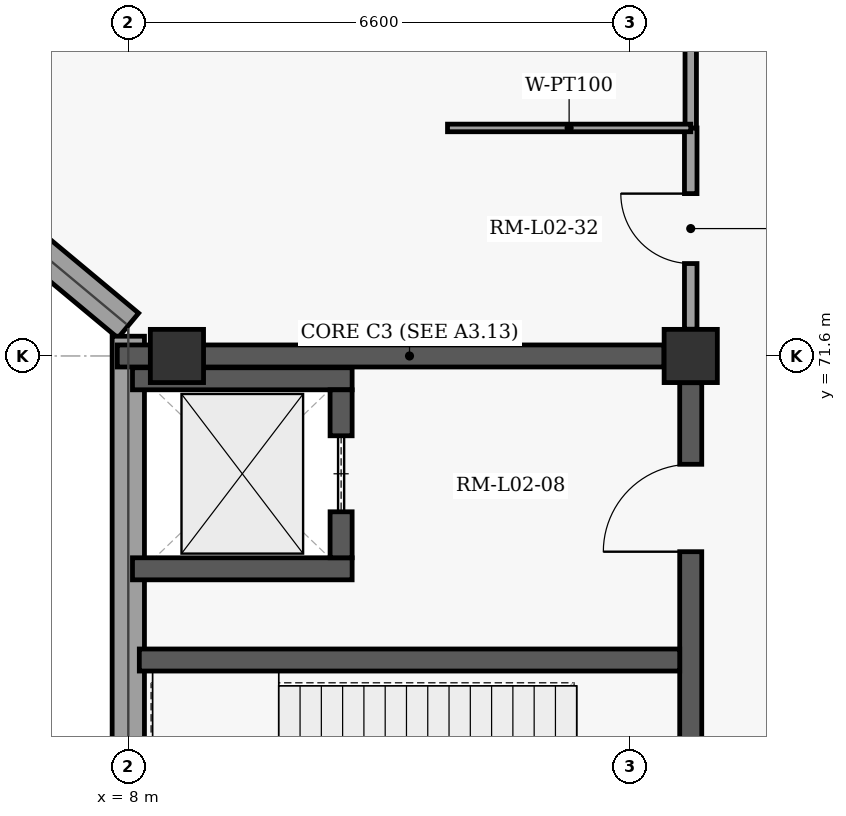
"""IFC4 building model, lengths in metres.
Left out: names, types, materials, properties, quantities, classifications, styles, units other than length and angle.
Written with IfcOpenShell. Run it as: python <this file> out.ifc"""

import sys

from ifc_helpers import new_model, si_unit, direction, frame, frame_2d, origin, origin_2d, place, context, subcontext, project, spatial, rectangle, extrude, element, fill, save


model = new_model("IFC4")
c1 = context("Model", 3, precision=1e-05, world=origin(), true_north=direction((0.0, 1.0)))
c2 = subcontext(c1, "Body", "Model", "MODEL_VIEW")
j1 = project(units=[si_unit("LENGTHUNIT", "METRE"), si_unit("PLANEANGLEUNIT", "RADIAN")], contexts=[c1])
p1 = place(None, origin())
s1 = spatial("IfcSite", under=j1, at=p1, CompositionType="ELEMENT")
p2 = place(p1, origin())
s2 = spatial("IfcBuilding", under=s1, at=p2, CompositionType="ELEMENT")
p3 = place(p2, frame((0.0, 0.0, 10.2)))
s3 = spatial("IfcBuildingStorey", under=s2, at=p3, CompositionType="ELEMENT", Elevation=10.2)
for number, where, z_axis, x_axis in (
    (1, (8.64, 71.6, 0.0), (0.0, 0.0, 1.0), (1.0, 0.0, 0.0)),
    (2, (15.4, 71.6, 0.0), (0.0, 0.0, 1.0), (1.0, 0.0, 0.0)),
):
    element("IfcColumn", number, at=place(p3, frame(where, z_axis=z_axis, x_axis=x_axis)), inside=s3, PredefinedType="COLUMN", context=c2, shape_type="SweptSolid", body=[
        extrude(rectangle(XDim=0.7, YDim=0.7, at=origin_2d()), origin(), (0.0, 0.0, 1.0), 5.4),
    ])
p4 = place(p3, frame((8.0, 72.0, 0.0), z_axis=(0.0, 0.0, 1.0), x_axis=(-0.768208468069, 0.640199773186, 0.0)))
e3 = element("IfcWall", 3, at=p4, inside=s3, PredefinedType="SOLIDWALL", context=c2, shape_type="SweptSolid", body=[
    extrude(rectangle(XDim=3.124, YDim=0.425, at=frame_2d((1.562, 0.0))), origin(), (0.0, 0.0, 1.0), 5.1),
])
p5 = place(p3, frame((8.0, 63.818, 0.0), z_axis=(0.0, 0.0, 1.0), x_axis=(0.0, 1.0, 0.0)))
e4 = element("IfcWall", 4, at=p5, inside=s3, PredefinedType="SOLIDWALL", context=c2, shape_type="SweptSolid", body=[
    extrude(rectangle(XDim=8.042, YDim=0.425, at=frame_2d((4.021, 0.0))), origin(), (0.0, 0.0, 1.0), 5.1),
])
p6 = place(p3, frame((7.855, 71.6, 0.0), z_axis=(0.0, 0.0, 1.0), x_axis=(1.0, 0.0, 0.0)))
e5 = element("IfcWall", 5, at=p6, inside=s3, PredefinedType="SHEAR", context=c2, shape_type="SweptSolid", body=[
    extrude(rectangle(XDim=7.193, YDim=0.29, at=frame_2d((3.597, 0.0))), origin(), (0.0, 0.0, 1.0), 5.1),
])
p7 = place(p3, frame((15.4, 64.145, 0.0), z_axis=(0.0, 0.0, 1.0), x_axis=(0.0, 1.0, 0.0)))
e6 = element("IfcWall", 6, at=p7, inside=s3, PredefinedType="SHEAR", context=c2, shape_type="SweptSolid", body=[
    extrude(rectangle(XDim=7.103, YDim=0.29, at=frame_2d((3.552, 0.0))), origin(), (0.0, 0.0, 1.0), 5.1),
])
p8 = place(p7, frame((1.105, 0.0, 0.0)))
e7 = element("IfcOpeningElement", 7, at=p8, cuts=e6, PredefinedType="OPENING", context=c2, shape_type="SweptSolid", body=[
    extrude(rectangle(XDim=1.1, YDim=2.15, at=frame_2d((0.55, 1.075))), frame((0.0, 0.155, 0.0), z_axis=(0.0, -1.0, 0.0), x_axis=(1.0, 0.0, 0.0)), (0.0, 0.0, 1.0), 0.31),
])
p9 = place(p7, frame((4.88, 0.0, 0.0)))
e8 = element("IfcOpeningElement", 8, at=p9, cuts=e6, PredefinedType="OPENING", context=c2, shape_type="SweptSolid", body=[
    extrude(rectangle(XDim=1.15, YDim=2.2, at=frame_2d((0.575, 1.1))), frame((0.0, 0.155, 0.0), z_axis=(0.0, -1.0, 0.0), x_axis=(1.0, 0.0, 0.0)), (0.0, 0.0, 1.0), 0.31),
])
p10 = place(p3, frame((8.145, 67.6, 0.0), z_axis=(0.0, 0.0, 1.0), x_axis=(1.0, 0.0, 0.0)))
e9 = element("IfcWall", 9, at=p10, inside=s3, PredefinedType="SHEAR", context=c2, shape_type="SweptSolid", body=[
    extrude(rectangle(XDim=7.11, YDim=0.29, at=frame_2d((3.555, 0.0))), origin(), (0.0, 0.0, 1.0), 5.1),
])
for number, where, z_axis, x_axis in (
    (10, (8.055, 68.8, 0.0), (0.0, 0.0, 1.0), (1.0, 0.0, 0.0)),
    (11, (8.055, 71.3, 0.0), (0.0, 0.0, 1.0), (1.0, 0.0, 0.0)),
):
    element("IfcWall", number, at=place(p3, frame(where, z_axis=z_axis, x_axis=x_axis)), inside=s3, PredefinedType="SHEAR", context=c2, shape_type="SweptSolid", body=[
        extrude(rectangle(XDim=2.89, YDim=0.29, at=frame_2d((1.445, 0.0))), origin(), (0.0, 0.0, 1.0), 5.1),
    ])
p11 = place(p3, frame((10.8, 68.945, 0.0), z_axis=(0.0, 0.0, 1.0), x_axis=(0.0, 1.0, 0.0)))
e12 = element("IfcWall", 12, at=p11, inside=s3, PredefinedType="SHEAR", context=c2, shape_type="SweptSolid", body=[
    extrude(rectangle(XDim=2.21, YDim=0.29, at=frame_2d((1.105, 0.0))), origin(), (0.0, 0.0, 1.0), 5.1),
])
p12 = place(p11, frame((0.605, 0.0, 0.0)))
e13 = element("IfcOpeningElement", 13, at=p12, cuts=e12, PredefinedType="OPENING", context=c2, shape_type="SweptSolid", body=[
    extrude(rectangle(XDim=1.0, YDim=2.15, at=frame_2d((0.5, 1.075))), frame((0.0, 0.155, 0.0), z_axis=(0.0, -1.0, 0.0), x_axis=(1.0, 0.0, 0.0)), (0.0, 0.0, 1.0), 0.31),
])
p13 = place(p3, frame((15.4, 71.952, 0.0), z_axis=(0.0, 0.0, 1.0), x_axis=(0.0, 1.0, 0.0)))
e14 = element("IfcWall", 14, at=p13, inside=s3, PredefinedType="PARTITIONING", context=c2, shape_type="SweptSolid", body=[
    extrude(rectangle(XDim=2.648, YDim=0.165, at=frame_2d((1.324, 0.0))), origin(), (0.0, 0.0, 1.0), 4.25),
])
p14 = place(p13, frame((0.864, 0.0, 0.0)))
e15 = element("IfcOpeningElement", 15, at=p14, cuts=e14, PredefinedType="OPENING", context=c2, shape_type="SweptSolid", body=[
    extrude(rectangle(XDim=0.92, YDim=2.1, at=frame_2d((0.46, 1.05))), frame((0.0, 0.093, 0.0), z_axis=(0.0, -1.0, 0.0), x_axis=(1.0, 0.0, 0.0)), (0.0, 0.0, 1.0), 0.185),
])
p15 = place(p3, frame((15.4, 74.6, 0.0), z_axis=(0.0, 0.0, 1.0), x_axis=(0.0, 1.0, 0.0)))
e16 = element("IfcWall", 16, at=p15, inside=s3, PredefinedType="PARTITIONING", context=c2, shape_type="SweptSolid", body=[
    extrude(rectangle(XDim=19.4, YDim=0.15, at=frame_2d((9.7, 0.0))), origin(), (0.0, 0.0, 1.0), 4.25),
])
p16 = place(p15, frame((9.225, 0.0, 0.0)))
e17 = element("IfcOpeningElement", 17, at=p16, cuts=e16, PredefinedType="OPENING", context=c2, shape_type="SweptSolid", body=[
    extrude(rectangle(XDim=0.95, YDim=2.1, at=frame_2d((0.475, 1.05))), frame((0.0, 0.085, 0.0), z_axis=(0.0, -1.0, 0.0), x_axis=(1.0, 0.0, 0.0)), (0.0, 0.0, 1.0), 0.17),
])
p17 = place(p3, frame((12.2, 74.6, 0.0), z_axis=(0.0, 0.0, 1.0), x_axis=(1.0, 0.0, 0.0)))
e18 = element("IfcWall", 18, at=p17, inside=s3, PredefinedType="PARTITIONING", context=c2, shape_type="SweptSolid", body=[
    extrude(rectangle(XDim=3.2, YDim=0.1, at=frame_2d((1.6, 0.0))), origin(), (0.0, 0.0, 1.0), 5.1),
])
p18 = place(p9, origin())
e19 = element("IfcDoor", 19, at=p18, inside=s3, OperationType="SINGLE_SWING_LEFT", PredefinedType="DOOR", context=c2, shape_type="SweptSolid", body=[
    extrude(rectangle(XDim=1.15, YDim=2.2, at=frame_2d((0.575, 1.1))), frame((0.0, 0.025, 0.0), z_axis=(0.0, -1.0, 0.0), x_axis=(1.0, 0.0, 0.0)), (0.0, 0.0, 1.0), 0.05),
])
fill(e8, e19)
p19 = place(p12, origin())
e20 = element("IfcDoor", 20, at=p19, inside=s3, OperationType="SLIDING_TO_LEFT", PredefinedType="DOOR", context=c2, shape_type="SweptSolid", body=[
    extrude(rectangle(XDim=1.0, YDim=2.15, at=frame_2d((0.5, 1.075))), frame((0.0, 0.025, 0.0), z_axis=(0.0, -1.0, 0.0), x_axis=(1.0, 0.0, 0.0)), (0.0, 0.0, 1.0), 0.05),
])
fill(e13, e20)
p20 = place(p14, origin())
e21 = element("IfcDoor", 21, at=p20, inside=s3, OperationType="SINGLE_SWING_RIGHT", PredefinedType="DOOR", context=c2, shape_type="SweptSolid", body=[
    extrude(rectangle(XDim=0.92, YDim=2.1, at=frame_2d((0.46, 1.05))), frame((0.0, 0.025, 0.0), z_axis=(0.0, -1.0, 0.0), x_axis=(1.0, 0.0, 0.0)), (0.0, 0.0, 1.0), 0.05),
])
fill(e15, e21)
save(model, sys.argv[1])
